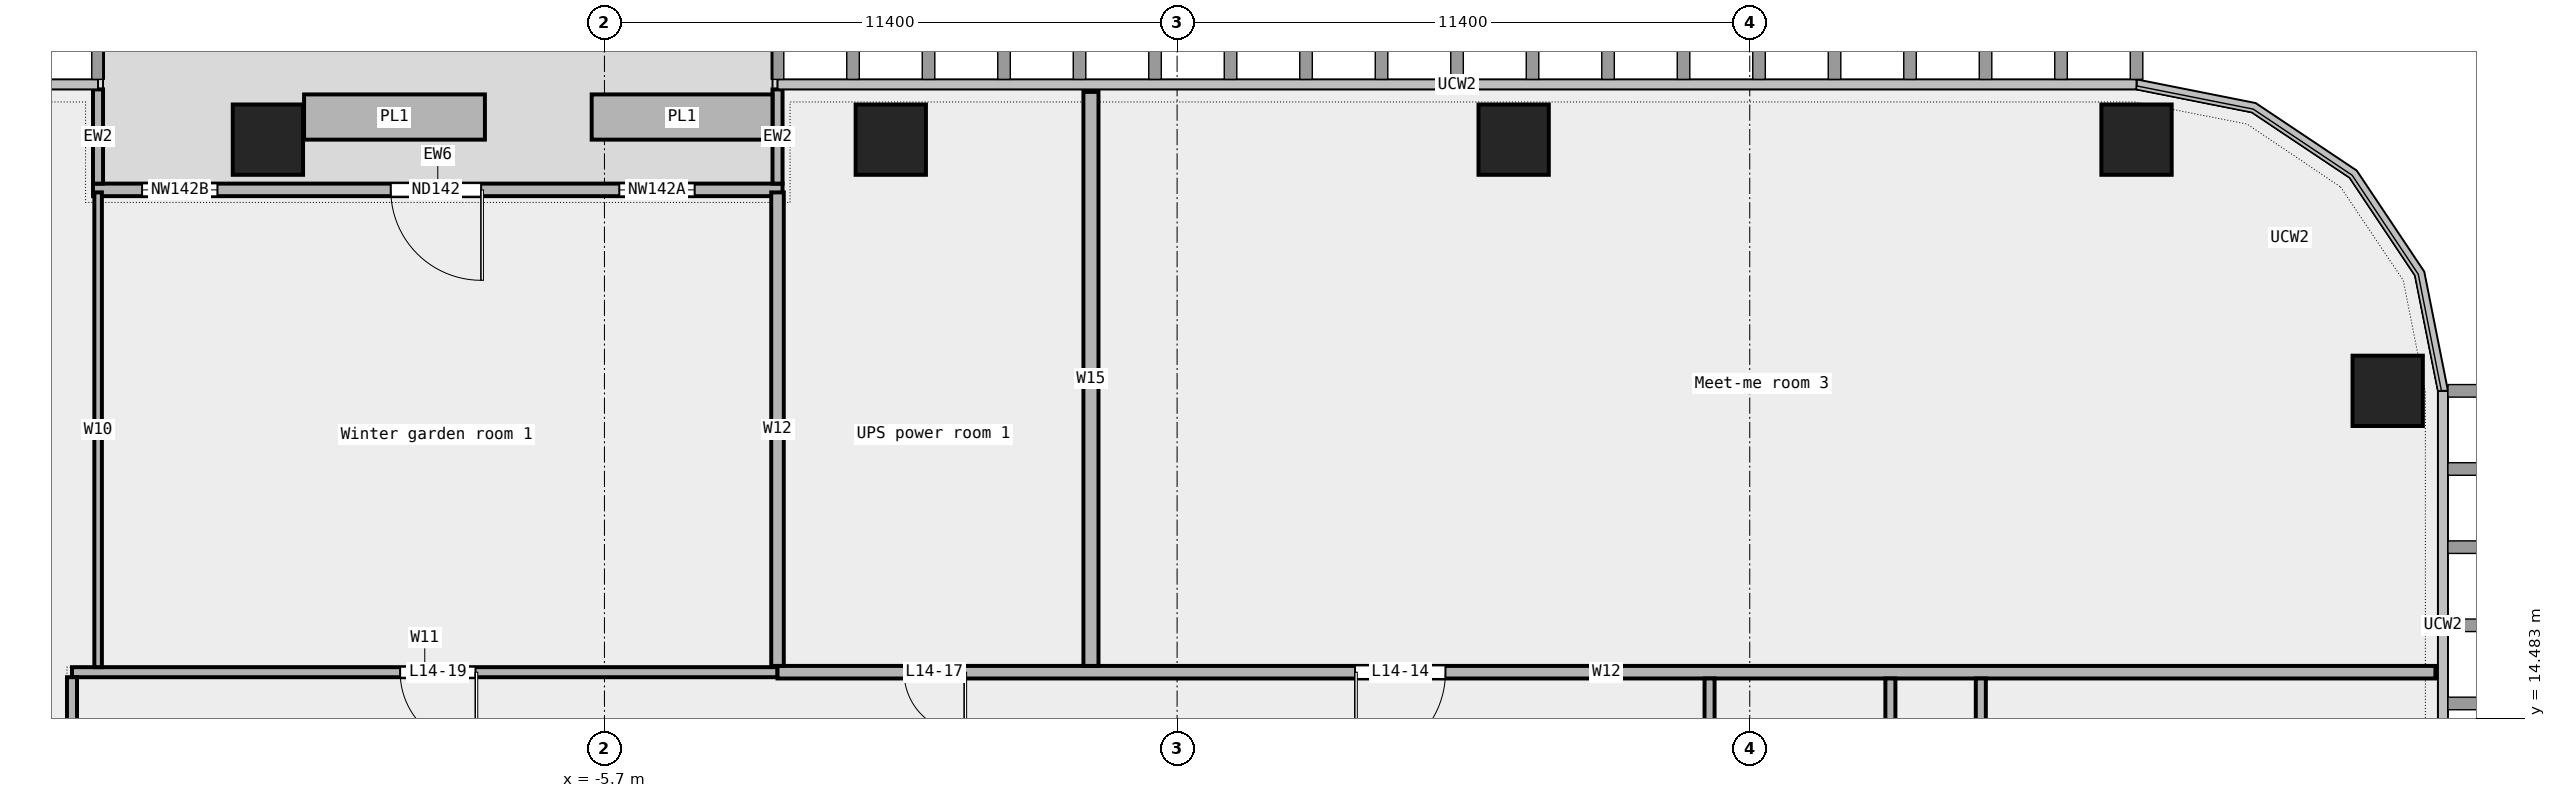
"""IFC4 building model, lengths in metres.
Left out: names, types, materials, properties, quantities, classifications, styles, units other than length and angle.
Written with IfcOpenShell. Run it as: python <this file> out.ifc"""

import sys

from ifc_helpers import new_model, si_unit, direction, frame, frame_2d, origin, origin_2d, place, context, subcontext, project, spatial, rectangle, extrude, element, fill, save


model = new_model("IFC4")
c1 = context("Model", 3, precision=1e-05, world=origin(), true_north=direction((0.0, 1.0)))
c2 = subcontext(c1, "Body", "Model", "MODEL_VIEW")
j1 = project(units=[si_unit("LENGTHUNIT", "METRE"), si_unit("PLANEANGLEUNIT", "RADIAN")], contexts=[c1])
p1 = place(None, origin())
s1 = spatial("IfcSite", under=j1, at=p1, CompositionType="ELEMENT")
p2 = place(p1, origin())
s2 = spatial("IfcBuilding", under=s1, at=p2, CompositionType="ELEMENT")
p3 = place(p2, frame((0.0, 0.0, 74.2)))
s3 = spatial("IfcBuildingStorey", under=s2, at=p3, CompositionType="ELEMENT", Elevation=74.2)
for number, where, z_axis, x_axis in (
    (1, (29.8, 21.0, 0.0), (0.0, 0.0, 1.0), (1.0, 0.0, 0.0)),
    (2, (24.8, 26.0, 0.0), (0.0, 0.0, 1.0), (1.0, 0.0, 0.0)),
    (3, (12.4, 26.0, 0.0), (0.0, 0.0, 1.0), (1.0, 0.0, 0.0)),
    (4, (0.0, 26.0, 0.0), (0.0, 0.0, 1.0), (1.0, 0.0, 0.0)),
    (5, (-12.4, 26.0, 0.0), (0.0, 0.0, 1.0), (1.0, 0.0, 0.0)),
):
    element("IfcColumn", number, at=place(p3, frame(where, z_axis=z_axis, x_axis=x_axis)), inside=s3, PredefinedType="COLUMN", context=c2, shape_type="SweptSolid", body=[
        extrude(rectangle(XDim=1.4, YDim=1.4, at=origin_2d()), origin(), (0.0, 0.0, 1.0), 4.35),
    ])
p4 = place(p3, frame((-2.155, 25.0, 0.0), z_axis=(0.0, 0.0, 1.0), x_axis=(-1.0, 0.0, 0.0)))
e6 = element("IfcWall", 6, at=p4, inside=s3, PredefinedType="STANDARD", context=c2, shape_type="SweptSolid", body=[
    extrude(rectangle(XDim=13.727, YDim=0.25, at=frame_2d((6.864, 0.0))), origin(), (0.0, 0.0, 1.0), 4.35),
])
p5 = place(p4, frame((1.75, 0.0, 0.45)))
e7 = element("IfcOpeningElement", 7, at=p5, cuts=e6, PredefinedType="OPENING", context=c2, shape_type="SweptSolid", body=[
    extrude(rectangle(XDim=1.5, YDim=3.0, at=frame_2d((0.75, 1.5))), frame((0.0, 0.137, 0.0), z_axis=(0.0, -1.0, 0.0), x_axis=(1.0, 0.0, 0.0)), (0.0, 0.0, 1.0), 0.274),
])
p6 = place(p4, frame((6.0, 0.0, 0.0)))
e8 = element("IfcOpeningElement", 8, at=p6, cuts=e6, PredefinedType="OPENING", context=c2, shape_type="SweptSolid", body=[
    extrude(rectangle(XDim=1.8, YDim=2.4, at=frame_2d((0.9, 1.2))), frame((0.0, 0.137, 0.0), z_axis=(0.0, -1.0, 0.0), x_axis=(1.0, 0.0, 0.0)), (0.0, 0.0, 1.0), 0.274),
])
p7 = place(p4, frame((11.25, 0.0, 0.45)))
e9 = element("IfcOpeningElement", 9, at=p7, cuts=e6, PredefinedType="OPENING", context=c2, shape_type="SweptSolid", body=[
    extrude(rectangle(XDim=1.5, YDim=3.0, at=frame_2d((0.75, 1.5))), frame((0.0, 0.137, 0.0), z_axis=(0.0, -1.0, 0.0), x_axis=(1.0, 0.0, 0.0)), (0.0, 0.0, 1.0), 0.274),
])
for number, where, z_axis, x_axis in (
    (10, (-2.255, 27.0, 0.0), (0.0, 0.0, 1.0), (0.0, -1.0, 0.0)),
    (11, (-15.782, 27.0, 0.0), (0.0, 0.0, 1.0), (0.0, -1.0, 0.0)),
):
    element("IfcWall", number, at=place(p3, frame(where, z_axis=z_axis, x_axis=x_axis)), inside=s3, PredefinedType="STANDARD", context=c2, shape_type="SweptSolid", body=[
        extrude(rectangle(XDim=1.875, YDim=0.2, at=frame_2d((0.938, 0.0))), origin(), (0.0, 0.0, 1.0), 4.35),
    ])
for number, where, z_axis, x_axis in (
    (12, (-2.354, 26.45, 0.0), (0.0, 0.0, 1.0), (-1.0, 0.0, 0.0)),
    (13, (-8.08, 26.45, 0.0), (0.0, 0.0, 1.0), (-1.0, 0.0, 0.0)),
):
    element("IfcWall", number, at=place(p3, frame(where, z_axis=z_axis, x_axis=x_axis)), inside=s3, PredefinedType="STANDARD", context=c2, shape_type="SweptSolid", body=[
        extrude(rectangle(XDim=3.6, YDim=0.9, at=frame_2d((1.8, 0.0))), origin(), (0.0, 0.0, 1.0), 0.7),
    ])
p8 = place(p3, frame((-16.3, 15.4, 0.0), z_axis=(0.0, 0.0, 1.0), x_axis=(1.0, 0.0, 0.0)))
e14 = element("IfcWall", 14, at=p8, inside=s3, PredefinedType="PARTITIONING", context=c2, shape_type="SweptSolid", body=[
    extrude(rectangle(XDim=14.045, YDim=0.2, at=frame_2d((7.022, 0.0))), origin(), (0.0, 0.0, 1.0), 4.35),
])
p9 = place(p8, frame((6.532, 0.0, 0.0)))
e15 = element("IfcOpeningElement", 15, at=p9, cuts=e14, PredefinedType="OPENING", context=c2, shape_type="SweptSolid", body=[
    extrude(rectangle(XDim=1.5, YDim=2.1, at=frame_2d((0.75, 1.05))), frame((0.0, 0.112, 0.0), z_axis=(0.0, -1.0, 0.0), x_axis=(1.0, 0.0, 0.0)), (0.0, 0.0, 1.0), 0.224),
])
p10 = place(p3, frame((-2.255, 15.4, 0.0), z_axis=(0.0, 0.0, 1.0), x_axis=(1.0, 0.0, 0.0)))
e16 = element("IfcWall", 16, at=p10, inside=s3, PredefinedType="PARTITIONING", context=c2, shape_type="SweptSolid", body=[
    extrude(rectangle(XDim=33.005, YDim=0.25, at=frame_2d((16.502, 0.0))), origin(), (0.0, 0.0, 1.0), 4.35),
])
p11 = place(p10, frame((11.498, 0.0, 0.0)))
e17 = element("IfcOpeningElement", 17, at=p11, cuts=e16, PredefinedType="OPENING", context=c2, shape_type="SweptSolid", body=[
    extrude(rectangle(XDim=1.8, YDim=2.1, at=frame_2d((0.9, 1.05))), frame((0.0, 0.137, 0.0), z_axis=(0.0, -1.0, 0.0), x_axis=(1.0, 0.0, 0.0)), (0.0, 0.0, 1.0), 0.274),
])
p12 = place(p10, frame((2.52, 0.0, 0.0)))
e18 = element("IfcOpeningElement", 18, at=p12, cuts=e16, PredefinedType="OPENING", context=c2, shape_type="SweptSolid", body=[
    extrude(rectangle(XDim=1.2, YDim=2.1, at=frame_2d((0.6, 1.05))), frame((0.0, 0.137, 0.0), z_axis=(0.0, -1.0, 0.0), x_axis=(1.0, 0.0, 0.0)), (0.0, 0.0, 1.0), 0.274),
])
p13 = place(p3, frame((-16.3, 11.8, 0.0), z_axis=(0.0, 0.0, 1.0), x_axis=(0.0, 1.0, 0.0)))
e19 = element("IfcWall", 19, at=p13, inside=s3, PredefinedType="PARTITIONING", context=c2, shape_type="SweptSolid", body=[
    extrude(rectangle(XDim=3.5, YDim=0.2, at=frame_2d((1.75, 0.0))), origin(), (0.0, 0.0, 1.0), 4.35),
])
p14 = place(p3, frame((-15.78, 15.5, 0.0), z_axis=(0.0, 0.0, 1.0), x_axis=(0.0, 1.0, 0.0)))
e20 = element("IfcWall", 20, at=p14, inside=s3, PredefinedType="PARTITIONING", context=c2, shape_type="SweptSolid", body=[
    extrude(rectangle(XDim=9.45, YDim=0.15, at=frame_2d((4.725, 0.0))), origin(), (0.0, 0.0, 1.0), 4.35),
])
p15 = place(p3, frame((-2.255, 15.525, 0.0), z_axis=(0.0, 0.0, 1.0), x_axis=(0.0, 1.0, 0.0)))
e21 = element("IfcWall", 21, at=p15, inside=s3, PredefinedType="PARTITIONING", context=c2, shape_type="SweptSolid", body=[
    extrude(rectangle(XDim=9.425, YDim=0.25, at=frame_2d((4.712, 0.0))), origin(), (0.0, 0.0, 1.0), 4.35),
])
p16 = place(p3, frame((3.985, 15.525, 0.0), z_axis=(0.0, 0.0, 1.0), x_axis=(0.0, 1.0, 0.0)))
e22 = element("IfcWall", 22, at=p16, inside=s3, PredefinedType="PARTITIONING", context=c2, shape_type="SweptSolid", body=[
    extrude(rectangle(XDim=11.425, YDim=0.3, at=frame_2d((5.712, 0.0))), origin(), (0.0, 0.0, 1.0), 4.35),
])
p17 = place(p3, frame((16.3, 11.8, 0.0), z_axis=(0.0, 0.0, 1.0), x_axis=(0.0, 1.0, 0.0)))
e23 = element("IfcWall", 23, at=p17, inside=s3, PredefinedType="PARTITIONING", context=c2, shape_type="SweptSolid", body=[
    extrude(rectangle(XDim=3.475, YDim=0.2, at=frame_2d((1.737, 0.0))), origin(), (0.0, 0.0, 1.0), 4.35),
])
p18 = place(p3, frame((19.9, 7.91, 0.0), z_axis=(0.0, 0.0, 1.0), x_axis=(0.0, 1.0, 0.0)))
e24 = element("IfcWall", 24, at=p18, inside=s3, PredefinedType="PARTITIONING", context=c2, shape_type="SweptSolid", body=[
    extrude(rectangle(XDim=7.365, YDim=0.2, at=frame_2d((3.683, 0.0))), origin(), (0.0, 0.0, 1.0), 4.35),
])
p19 = place(p18, frame((3.232, 0.0, 0.0)))
e25 = element("IfcOpeningElement", 25, at=p19, cuts=e24, PredefinedType="OPENING", context=c2, shape_type="SweptSolid", body=[
    extrude(rectangle(XDim=0.9, YDim=2.1, at=frame_2d((0.45, 1.05))), frame((0.0, 0.112, 0.0), z_axis=(0.0, -1.0, 0.0), x_axis=(1.0, 0.0, 0.0)), (0.0, 0.0, 1.0), 0.224),
])
p20 = place(p3, frame((21.7, -2.21, 0.0), z_axis=(0.0, 0.0, 1.0), x_axis=(0.0, 1.0, 0.0)))
e26 = element("IfcWall", 26, at=p20, inside=s3, PredefinedType="PARTITIONING", context=c2, shape_type="SweptSolid", body=[
    extrude(rectangle(XDim=17.485, YDim=0.2, at=frame_2d((8.742, 0.0))), origin(), (0.0, 0.0, 1.0), 4.35),
])
p21 = place(p20, frame((15.23, 0.0, 0.0)))
e27 = element("IfcOpeningElement", 27, at=p21, cuts=e26, PredefinedType="OPENING", context=c2, shape_type="SweptSolid", body=[
    extrude(rectangle(XDim=0.9, YDim=2.1, at=frame_2d((0.45, 1.05))), frame((0.0, 0.112, 0.0), z_axis=(0.0, -1.0, 0.0), x_axis=(1.0, 0.0, 0.0)), (0.0, 0.0, 1.0), 0.224),
])
p22 = place(p20, frame((6.188, 0.0, 0.0)))
e28 = element("IfcOpeningElement", 28, at=p22, cuts=e26, PredefinedType="OPENING", context=c2, shape_type="SweptSolid", body=[
    extrude(rectangle(XDim=1.5, YDim=2.1, at=frame_2d((0.75, 1.05))), frame((0.0, 0.112, 0.0), z_axis=(0.0, -1.0, 0.0), x_axis=(1.0, 0.0, 0.0)), (0.0, 0.0, 1.0), 0.224),
])
p23 = place(p5, origin())
e29 = element("IfcWindow", 29, at=p23, inside=s3, PartitioningType="SINGLE_PANEL", PredefinedType="WINDOW", context=c2, shape_type="SweptSolid", body=[
    extrude(rectangle(XDim=1.5, YDim=3.0, at=frame_2d((0.75, 1.5))), frame((0.0, 0.03, 0.0), z_axis=(0.0, -1.0, 0.0), x_axis=(1.0, 0.0, 0.0)), (0.0, 0.0, 1.0), 0.06),
])
fill(e7, e29)
p24 = place(p6, origin())
e30 = element("IfcDoor", 30, at=p24, inside=s3, OperationType="DOUBLE_DOOR_SINGLE_SWING", PredefinedType="DOOR", context=c2, shape_type="SweptSolid", body=[
    extrude(rectangle(XDim=1.8, YDim=2.4, at=frame_2d((0.9, 1.2))), frame((0.0, 0.025, 0.0), z_axis=(0.0, -1.0, 0.0), x_axis=(1.0, 0.0, 0.0)), (0.0, 0.0, 1.0), 0.05),
])
fill(e8, e30)
p25 = place(p7, origin())
e31 = element("IfcWindow", 31, at=p25, inside=s3, PartitioningType="SINGLE_PANEL", PredefinedType="WINDOW", context=c2, shape_type="SweptSolid", body=[
    extrude(rectangle(XDim=1.5, YDim=3.0, at=frame_2d((0.75, 1.5))), frame((0.0, 0.03, 0.0), z_axis=(0.0, -1.0, 0.0), x_axis=(1.0, 0.0, 0.0)), (0.0, 0.0, 1.0), 0.06),
])
fill(e9, e31)
p26 = place(p11, origin())
e32 = element("IfcDoor", 32, at=p26, inside=s3, OperationType="DOUBLE_DOOR_SINGLE_SWING", PredefinedType="DOOR", context=c2, shape_type="SweptSolid", body=[
    extrude(rectangle(XDim=1.8, YDim=2.1, at=frame_2d((0.9, 1.05))), frame((0.0, 0.025, 0.0), z_axis=(0.0, -1.0, 0.0), x_axis=(1.0, 0.0, 0.0)), (0.0, 0.0, 1.0), 0.05),
])
fill(e17, e32)
p27 = place(p12, origin())
e33 = element("IfcDoor", 33, at=p27, inside=s3, OperationType="SINGLE_SWING_LEFT", PredefinedType="DOOR", context=c2, shape_type="SweptSolid", body=[
    extrude(rectangle(XDim=1.2, YDim=2.1, at=frame_2d((0.6, 1.05))), frame((0.0, 0.025, 0.0), z_axis=(0.0, -1.0, 0.0), x_axis=(1.0, 0.0, 0.0)), (0.0, 0.0, 1.0), 0.05),
])
fill(e18, e33)
p28 = place(p9, origin())
e34 = element("IfcDoor", 34, at=p28, inside=s3, OperationType="DOUBLE_DOOR_SINGLE_SWING", PredefinedType="DOOR", context=c2, shape_type="SweptSolid", body=[
    extrude(rectangle(XDim=1.5, YDim=2.1, at=frame_2d((0.75, 1.05))), frame((0.0, 0.025, 0.0), z_axis=(0.0, -1.0, 0.0), x_axis=(1.0, 0.0, 0.0)), (0.0, 0.0, 1.0), 0.05),
])
fill(e15, e34)
save(model, sys.argv[1])
